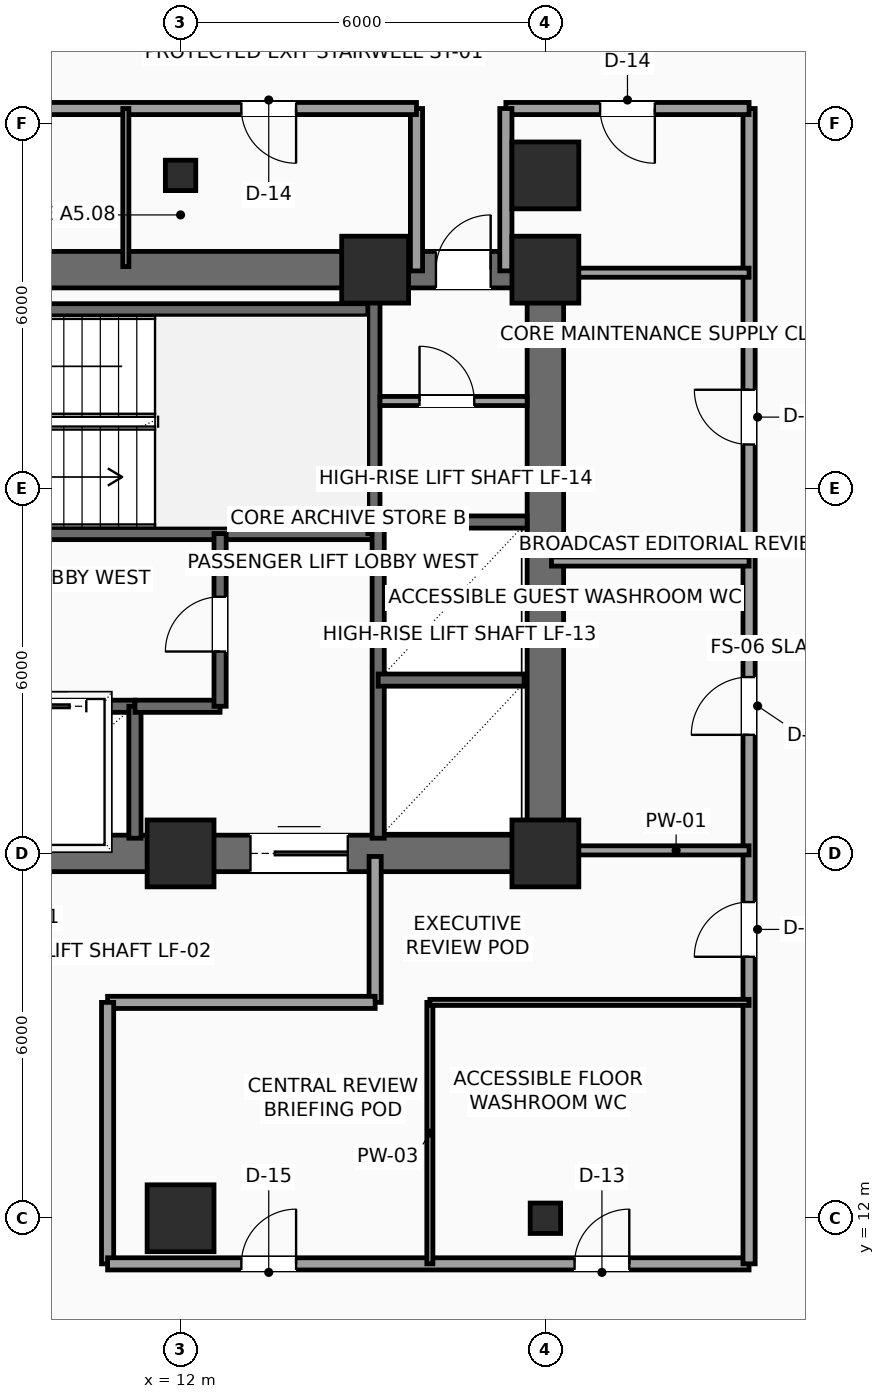
"""IFC4 building model, lengths in metres.
Left out: names, types, materials, properties, quantities, classifications, styles, units other than length and angle.
Written with IfcOpenShell. Run it as: python <this file> out.ifc"""

import sys

from ifc_helpers import new_model, si_unit, direction, frame, frame_2d, origin, origin_2d, place, context, subcontext, project, spatial, rectangle, hollow_rectangle, extrude, element, fill, save


model = new_model("IFC4")
c1 = context("Model", 3, precision=1e-05, world=origin(), true_north=direction((0.0, 1.0)))
c2 = subcontext(c1, "Body", "Model", "MODEL_VIEW")
j1 = project(units=[si_unit("LENGTHUNIT", "METRE"), si_unit("PLANEANGLEUNIT", "RADIAN")], contexts=[c1])
p1 = place(None, origin())
s1 = spatial("IfcSite", under=j1, at=p1, CompositionType="ELEMENT")
p2 = place(p1, origin())
s2 = spatial("IfcBuilding", under=s1, at=p2, CompositionType="ELEMENT")
p3 = place(p2, frame((0.0, 0.0, 145.65)))
s3 = spatial("IfcBuildingStorey", under=s2, at=p3, CompositionType="ELEMENT", Elevation=145.65)
for number, where, z_axis, x_axis in (
    (1, (12.0, 18.0, 0.0), (0.0, 0.0, 1.0), (1.0, 0.0, 0.0)),
    (2, (18.0, 18.0, 0.0), (0.0, 0.0, 1.0), (1.0, 0.0, 0.0)),
    (3, (15.2, 27.6, 0.0), (0.0, 0.0, 1.0), (1.0, 0.0, 0.0)),
    (4, (18.0, 27.6, 0.0), (0.0, 0.0, 1.0), (1.0, 0.0, 0.0)),
    (5, (12.0, 12.0, 0.0), (0.0, 0.0, 1.0), (1.0, 0.0, 0.0)),
):
    element("IfcColumn", number, at=place(p3, frame(where, z_axis=z_axis, x_axis=x_axis)), inside=s3, PredefinedType="COLUMN", context=c2, shape_type="SweptSolid", body=[
        extrude(rectangle(XDim=1.1, YDim=1.1, at=origin_2d()), origin(), (0.0, 0.0, 1.0), 3.75),
    ])
for number, where, z_axis, x_axis in (
    (6, (12.0, 29.15, 0.0), (0.0, 0.0, 1.0), (1.0, 0.0, 0.0)),
    (7, (18.0, 12.0, 0.0), (0.0, 0.0, 1.0), (1.0, 0.0, 0.0)),
):
    element("IfcColumn", number, at=place(p3, frame(where, z_axis=z_axis, x_axis=x_axis)), inside=s3, PredefinedType="COLUMN", context=c2, shape_type="SweptSolid", body=[
        extrude(hollow_rectangle(XDim=0.5, YDim=0.5, WallThickness=0.025, InnerFilletRadius=0.025, OuterFilletRadius=0.04, at=origin_2d()), origin(), (0.0, 0.0, 1.0), 3.75),
    ])
p4 = place(p3, frame((18.0, 29.15, 0.0), z_axis=(0.0, 0.0, 1.0), x_axis=(1.0, 0.0, 0.0)))
e8 = element("IfcColumn", 8, at=p4, inside=s3, PredefinedType="COLUMN", context=c2, shape_type="SweptSolid", body=[
    extrude(rectangle(XDim=1.1, YDim=1.1, at=origin_2d()), origin(), (0.0, 0.0, 1.0), 3.75),
])
p5 = place(p3, frame((6.0, 18.0, 0.0), z_axis=(0.0, 0.0, 1.0), x_axis=(1.0, 0.0, 0.0)))
e9 = element("IfcWall", 9, at=p5, inside=s3, PredefinedType="SHEAR", context=c2, shape_type="SweptSolid", body=[
    extrude(rectangle(XDim=12.0, YDim=0.6, at=frame_2d((6.0, 0.0))), origin(), (0.0, 0.0, 1.0), 3.525),
])
p6 = place(p5, frame((7.15, 0.0, 0.0)))
e10 = element("IfcOpeningElement", 10, at=p6, cuts=e9, PredefinedType="OPENING", context=c2, shape_type="SweptSolid", body=[
    extrude(rectangle(XDim=1.6, YDim=2.3, at=frame_2d((0.8, 1.15))), frame((0.0, 0.31, 0.0), z_axis=(0.0, -1.0, 0.0), x_axis=(1.0, 0.0, 0.0)), (0.0, 0.0, 1.0), 0.62),
])
p7 = place(p3, frame((6.0, 27.6, 0.0), z_axis=(0.0, 0.0, 1.0), x_axis=(1.0, 0.0, 0.0)))
e11 = element("IfcWall", 11, at=p7, inside=s3, PredefinedType="SHEAR", context=c2, shape_type="SweptSolid", body=[
    extrude(rectangle(XDim=12.0, YDim=0.6, at=frame_2d((6.0, 0.0))), origin(), (0.0, 0.0, 1.0), 3.525),
])
p8 = place(p7, frame((10.2, 0.0, 0.0)))
e12 = element("IfcOpeningElement", 12, at=p8, cuts=e11, PredefinedType="OPENING", context=c2, shape_type="SweptSolid", body=[
    extrude(rectangle(XDim=0.9, YDim=2.15, at=frame_2d((0.45, 1.075))), frame((0.0, 0.31, 0.0), z_axis=(0.0, -1.0, 0.0), x_axis=(1.0, 0.0, 0.0)), (0.0, 0.0, 1.0), 0.62),
])
p9 = place(p3, frame((18.0, 18.0, 0.0), z_axis=(0.0, 0.0, 1.0), x_axis=(0.0, 1.0, 0.0)))
e13 = element("IfcWall", 13, at=p9, inside=s3, PredefinedType="SHEAR", context=c2, shape_type="SweptSolid", body=[
    extrude(rectangle(XDim=9.6, YDim=0.6, at=frame_2d((4.8, 0.0))), origin(), (0.0, 0.0, 1.0), 3.525),
])
p10 = place(p3, frame((6.3, 23.26, 0.0), z_axis=(0.0, 0.0, 1.0), x_axis=(1.0, 0.0, 0.0)))
e14 = element("IfcWall", 14, at=p10, inside=s3, PredefinedType="SHEAR", context=c2, shape_type="SweptSolid", body=[
    extrude(rectangle(XDim=8.88, YDim=0.2, at=frame_2d((4.44, 0.0))), origin(), (0.0, 0.0, 1.0), 3.525),
])
p11 = place(p10, frame((0.35, 0.0, 0.0)))
e15 = element("IfcOpeningElement", 15, at=p11, cuts=e14, PredefinedType="OPENING", context=c2, shape_type="SweptSolid", body=[
    extrude(rectangle(XDim=1.1, YDim=2.2, at=frame_2d((0.55, 1.1))), frame((0.0, 0.11, 0.0), z_axis=(0.0, -1.0, 0.0), x_axis=(1.0, 0.0, 0.0)), (0.0, 0.0, 1.0), 0.22),
])
p12 = place(p3, frame((6.3, 26.94, 0.0), z_axis=(0.0, 0.0, 1.0), x_axis=(1.0, 0.0, 0.0)))
e16 = element("IfcWall", 16, at=p12, inside=s3, PredefinedType="SHEAR", context=c2, shape_type="SweptSolid", body=[
    extrude(rectangle(XDim=8.88, YDim=0.2, at=frame_2d((4.44, 0.0))), origin(), (0.0, 0.0, 1.0), 3.525),
])
p13 = place(p3, frame((15.18, 23.26, 0.0), z_axis=(0.0, 0.0, 1.0), x_axis=(0.0, 1.0, 0.0)))
e17 = element("IfcWall", 17, at=p13, inside=s3, PredefinedType="SHEAR", context=c2, shape_type="SweptSolid", body=[
    extrude(rectangle(XDim=4.04, YDim=0.2, at=frame_2d((2.02, 0.0))), origin(), (0.0, 0.0, 1.0), 3.525),
])
p14 = place(p3, frame((6.3, 20.42, 0.0), z_axis=(0.0, 0.0, 1.0), x_axis=(1.0, 0.0, 0.0)))
e18 = element("IfcWall", 18, at=p14, inside=s3, PredefinedType="SHEAR", context=c2, shape_type="SweptSolid", body=[
    extrude(rectangle(XDim=4.95, YDim=0.2, at=frame_2d((2.475, 0.0))), origin(), (0.0, 0.0, 1.0), 3.525),
])
p15 = place(p14, frame((0.65, 0.0, 0.0)))
e19 = element("IfcOpeningElement", 19, at=p15, cuts=e18, PredefinedType="OPENING", context=c2, shape_type="SweptSolid", body=[
    extrude(rectangle(XDim=1.1, YDim=2.2, at=frame_2d((0.55, 1.1))), frame((0.0, 0.11, 0.0), z_axis=(0.0, -1.0, 0.0), x_axis=(1.0, 0.0, 0.0)), (0.0, 0.0, 1.0), 0.22),
])
p16 = place(p14, frame((3.05, 0.0, 0.0)))
e20 = element("IfcOpeningElement", 20, at=p16, cuts=e18, PredefinedType="OPENING", context=c2, shape_type="SweptSolid", body=[
    extrude(rectangle(XDim=1.1, YDim=2.2, at=frame_2d((0.55, 1.1))), frame((0.0, 0.11, 0.0), z_axis=(0.0, -1.0, 0.0), x_axis=(1.0, 0.0, 0.0)), (0.0, 0.0, 1.0), 0.22),
])
p17 = place(p3, frame((11.25, 18.25, 0.0), z_axis=(0.0, 0.0, 1.0), x_axis=(0.0, 1.0, 0.0)))
e21 = element("IfcWall", 21, at=p17, inside=s3, PredefinedType="SHEAR", context=c2, shape_type="SweptSolid", body=[
    extrude(rectangle(XDim=2.17, YDim=0.2, at=frame_2d((1.085, 0.0))), origin(), (0.0, 0.0, 1.0), 3.525),
])
p18 = place(p3, frame((11.25, 20.42, 0.0), z_axis=(0.0, 0.0, 1.0), x_axis=(1.0, 0.0, 0.0)))
e22 = element("IfcWall", 22, at=p18, inside=s3, PredefinedType="SHEAR", context=c2, shape_type="SweptSolid", body=[
    extrude(rectangle(XDim=1.4, YDim=0.2, at=frame_2d((0.7, 0.0))), origin(), (0.0, 0.0, 1.0), 3.525),
])
p19 = place(p3, frame((12.65, 20.42, 0.0), z_axis=(0.0, 0.0, 1.0), x_axis=(0.0, 1.0, 0.0)))
e23 = element("IfcWall", 23, at=p19, inside=s3, PredefinedType="SHEAR", context=c2, shape_type="SweptSolid", body=[
    extrude(rectangle(XDim=2.84, YDim=0.2, at=frame_2d((1.42, 0.0))), origin(), (0.0, 0.0, 1.0), 3.525),
])
p20 = place(p19, frame((0.9, 0.0, 0.0)))
e24 = element("IfcOpeningElement", 24, at=p20, cuts=e23, PredefinedType="OPENING", context=c2, shape_type="SweptSolid", body=[
    extrude(rectangle(XDim=0.9, YDim=2.15, at=frame_2d((0.45, 1.075))), frame((0.0, 0.11, 0.0), z_axis=(0.0, -1.0, 0.0), x_axis=(1.0, 0.0, 0.0)), (0.0, 0.0, 1.0), 0.22),
])
p21 = place(p3, frame((15.25, 18.25, 0.0), z_axis=(0.0, 0.0, 1.0), x_axis=(0.0, 1.0, 0.0)))
e25 = element("IfcWall", 25, at=p21, inside=s3, PredefinedType="SHEAR", context=c2, shape_type="SweptSolid", body=[
    extrude(rectangle(XDim=5.2, YDim=0.2, at=frame_2d((2.6, 0.0))), origin(), (0.0, 0.0, 1.0), 3.525),
])
p22 = place(p3, frame((15.25, 20.85, 0.0), z_axis=(0.0, 0.0, 1.0), x_axis=(1.0, 0.0, 0.0)))
e26 = element("IfcWall", 26, at=p22, inside=s3, PredefinedType="SHEAR", context=c2, shape_type="SweptSolid", body=[
    extrude(rectangle(XDim=2.4, YDim=0.2, at=frame_2d((1.2, 0.0))), origin(), (0.0, 0.0, 1.0), 3.525),
])
p23 = place(p3, frame((15.25, 23.45, 0.0), z_axis=(0.0, 0.0, 1.0), x_axis=(1.0, 0.0, 0.0)))
e27 = element("IfcWall", 27, at=p23, inside=s3, PredefinedType="SHEAR", context=c2, shape_type="SweptSolid", body=[
    extrude(rectangle(XDim=2.45, YDim=0.2, at=frame_2d((1.225, 0.0))), origin(), (0.0, 0.0, 1.0), 3.525),
])
p24 = place(p3, frame((15.28, 25.44, 0.0), z_axis=(0.0, 0.0, 1.0), x_axis=(1.0, 0.0, 0.0)))
e28 = element("IfcWall", 28, at=p24, inside=s3, PredefinedType="PARTITIONING", context=c2, shape_type="SweptSolid", body=[
    extrude(rectangle(XDim=2.42, YDim=0.15, at=frame_2d((1.21, 0.0))), origin(), (0.0, 0.0, 1.0), 3.525),
])
p25 = place(p24, frame((0.65, 0.0, 0.0)))
e29 = element("IfcOpeningElement", 29, at=p25, cuts=e28, PredefinedType="OPENING", context=c2, shape_type="SweptSolid", body=[
    extrude(rectangle(XDim=0.9, YDim=2.15, at=frame_2d((0.45, 1.075))), frame((0.0, 0.085, 0.0), z_axis=(0.0, -1.0, 0.0), x_axis=(1.0, 0.0, 0.0)), (0.0, 0.0, 1.0), 0.17),
])
p26 = place(p3, frame((15.2, 17.95, 0.0), z_axis=(0.0, 0.0, 1.0), x_axis=(0.0, -1.0, 0.0)))
e30 = element("IfcWall", 30, at=p26, inside=s3, PredefinedType="PARTITIONING", context=c2, shape_type="SweptSolid", body=[
    extrude(rectangle(XDim=2.4, YDim=0.2, at=frame_2d((1.2, 0.0))), origin(), (0.0, 0.0, 1.0), 3.525),
])
p27 = place(p3, frame((15.2, 15.55, 0.0), z_axis=(0.0, 0.0, 1.0), x_axis=(-1.0, 0.0, 0.0)))
e31 = element("IfcWall", 31, at=p27, inside=s3, PredefinedType="PARTITIONING", context=c2, shape_type="SweptSolid", body=[
    extrude(rectangle(XDim=4.4, YDim=0.2, at=frame_2d((2.2, 0.0))), origin(), (0.0, 0.0, 1.0), 3.525),
])
p28 = place(p3, frame((10.8, 15.55, 0.0), z_axis=(0.0, 0.0, 1.0), x_axis=(0.0, -1.0, 0.0)))
e32 = element("IfcWall", 32, at=p28, inside=s3, PredefinedType="PARTITIONING", context=c2, shape_type="SweptSolid", body=[
    extrude(rectangle(XDim=4.3, YDim=0.2, at=frame_2d((2.15, 0.0))), origin(), (0.0, 0.0, 1.0), 3.525),
])
p29 = place(p3, frame((10.8, 11.25, 0.0), z_axis=(0.0, 0.0, 1.0), x_axis=(1.0, 0.0, 0.0)))
e33 = element("IfcWall", 33, at=p29, inside=s3, PredefinedType="PARTITIONING", context=c2, shape_type="SweptSolid", body=[
    extrude(rectangle(XDim=10.55, YDim=0.2, at=frame_2d((5.275, 0.0))), origin(), (0.0, 0.0, 1.0), 3.525),
])
p30 = place(p29, frame((2.2, 0.0, 0.0)))
e34 = element("IfcOpeningElement", 34, at=p30, cuts=e33, PredefinedType="OPENING", context=c2, shape_type="SweptSolid", body=[
    extrude(rectangle(XDim=0.9, YDim=2.1, at=frame_2d((0.45, 1.05))), frame((0.0, 0.11, 0.0), z_axis=(0.0, -1.0, 0.0), x_axis=(1.0, 0.0, 0.0)), (0.0, 0.0, 1.0), 0.22),
])
p31 = place(p29, frame((7.68, 0.0, 0.0)))
e35 = element("IfcOpeningElement", 35, at=p31, cuts=e33, PredefinedType="OPENING", context=c2, shape_type="SweptSolid", body=[
    extrude(rectangle(XDim=0.9, YDim=2.1, at=frame_2d((0.45, 1.05))), frame((0.0, 0.11, 0.0), z_axis=(0.0, -1.0, 0.0), x_axis=(1.0, 0.0, 0.0)), (0.0, 0.0, 1.0), 0.22),
])
p32 = place(p3, frame((21.35, 11.25, 0.0), z_axis=(0.0, 0.0, 1.0), x_axis=(0.0, 1.0, 0.0)))
e36 = element("IfcWall", 36, at=p32, inside=s3, PredefinedType="PARTITIONING", context=c2, shape_type="SweptSolid", body=[
    extrude(rectangle(XDim=19.0, YDim=0.2, at=frame_2d((9.5, 0.0))), origin(), (0.0, 0.0, 1.0), 3.525),
])
p33 = place(p32, frame((8.7, 0.0, 0.0)))
e37 = element("IfcOpeningElement", 37, at=p33, cuts=e36, PredefinedType="OPENING", context=c2, shape_type="SweptSolid", body=[
    extrude(rectangle(XDim=0.95, YDim=2.15, at=frame_2d((0.475, 1.075))), frame((0.0, 0.11, 0.0), z_axis=(0.0, -1.0, 0.0), x_axis=(1.0, 0.0, 0.0)), (0.0, 0.0, 1.0), 0.22),
])
p34 = place(p32, frame((13.475, 0.0, 0.0)))
e38 = element("IfcOpeningElement", 38, at=p34, cuts=e36, PredefinedType="OPENING", context=c2, shape_type="SweptSolid", body=[
    extrude(rectangle(XDim=0.9, YDim=2.1, at=frame_2d((0.45, 1.05))), frame((0.0, 0.11, 0.0), z_axis=(0.0, -1.0, 0.0), x_axis=(1.0, 0.0, 0.0)), (0.0, 0.0, 1.0), 0.22),
])
p35 = place(p32, frame((5.05, 0.0, 0.0)))
e39 = element("IfcOpeningElement", 39, at=p35, cuts=e36, PredefinedType="OPENING", context=c2, shape_type="SweptSolid", body=[
    extrude(rectangle(XDim=0.9, YDim=2.1, at=frame_2d((0.45, 1.05))), frame((0.0, 0.11, 0.0), z_axis=(0.0, -1.0, 0.0), x_axis=(1.0, 0.0, 0.0)), (0.0, 0.0, 1.0), 0.22),
])
p36 = place(p3, frame((21.35, 30.25, 0.0), z_axis=(0.0, 0.0, 1.0), x_axis=(-1.0, 0.0, 0.0)))
e40 = element("IfcWall", 40, at=p36, inside=s3, PredefinedType="PARTITIONING", context=c2, shape_type="SweptSolid", body=[
    extrude(rectangle(XDim=4.0, YDim=0.2, at=frame_2d((2.0, 0.0))), origin(), (0.0, 0.0, 1.0), 3.525),
])
p37 = place(p36, frame((1.55, 0.0, 0.0)))
e41 = element("IfcOpeningElement", 41, at=p37, cuts=e40, PredefinedType="OPENING", context=c2, shape_type="SweptSolid", body=[
    extrude(rectangle(XDim=0.9, YDim=2.1, at=frame_2d((0.45, 1.05))), frame((0.0, 0.11, 0.0), z_axis=(0.0, -1.0, 0.0), x_axis=(1.0, 0.0, 0.0)), (0.0, 0.0, 1.0), 0.22),
])
for number, where, z_axis, x_axis in (
    (42, (17.35, 30.25, 0.0), (0.0, 0.0, 1.0), (0.0, -1.0, 0.0)),
    (43, (15.88, 27.58, 0.0), (0.0, 0.0, 1.0), (0.0, 1.0, 0.0)),
):
    element("IfcWall", number, at=place(p3, frame(where, z_axis=z_axis, x_axis=x_axis)), inside=s3, PredefinedType="PARTITIONING", context=c2, shape_type="SweptSolid", body=[
        extrude(rectangle(XDim=2.67, YDim=0.2, at=frame_2d((1.335, 0.0))), origin(), (0.0, 0.0, 1.0), 3.525),
    ])
p38 = place(p3, frame((15.88, 30.25, 0.0), z_axis=(0.0, 0.0, 1.0), x_axis=(-1.0, 0.0, 0.0)))
e44 = element("IfcWall", 44, at=p38, inside=s3, PredefinedType="PARTITIONING", context=c2, shape_type="SweptSolid", body=[
    extrude(rectangle(XDim=15.58, YDim=0.2, at=frame_2d((7.79, 0.0))), origin(), (0.0, 0.0, 1.0), 3.525),
])
p39 = place(p38, frame((12.28, 0.0, 0.0)))
e45 = element("IfcOpeningElement", 45, at=p39, cuts=e44, PredefinedType="OPENING", context=c2, shape_type="SweptSolid", body=[
    extrude(rectangle(XDim=0.9, YDim=2.1, at=frame_2d((0.45, 1.05))), frame((0.0, 0.11, 0.0), z_axis=(0.0, -1.0, 0.0), x_axis=(1.0, 0.0, 0.0)), (0.0, 0.0, 1.0), 0.22),
])
p40 = place(p38, frame((6.73, 0.0, 0.0)))
e46 = element("IfcOpeningElement", 46, at=p40, cuts=e44, PredefinedType="OPENING", context=c2, shape_type="SweptSolid", body=[
    extrude(rectangle(XDim=0.9, YDim=2.1, at=frame_2d((0.45, 1.05))), frame((0.0, 0.11, 0.0), z_axis=(0.0, -1.0, 0.0), x_axis=(1.0, 0.0, 0.0)), (0.0, 0.0, 1.0), 0.22),
])
p41 = place(p38, frame((1.98, 0.0, 0.0)))
e47 = element("IfcOpeningElement", 47, at=p41, cuts=e44, PredefinedType="OPENING", context=c2, shape_type="SweptSolid", body=[
    extrude(rectangle(XDim=0.9, YDim=2.1, at=frame_2d((0.45, 1.05))), frame((0.0, 0.11, 0.0), z_axis=(0.0, -1.0, 0.0), x_axis=(1.0, 0.0, 0.0)), (0.0, 0.0, 1.0), 0.22),
])
p42 = place(p3, frame((16.1, 11.25, 0.0), z_axis=(0.0, 0.0, 1.0), x_axis=(0.0, 1.0, 0.0)))
e48 = element("IfcWall", 48, at=p42, inside=s3, PredefinedType="PARTITIONING", context=c2, shape_type="SweptSolid", body=[
    extrude(rectangle(XDim=4.3, YDim=0.1, at=frame_2d((2.15, 0.0))), origin(), (0.0, 0.0, 1.0), 3.525),
])
p43 = place(p3, frame((16.1, 15.55, 0.0), z_axis=(0.0, 0.0, 1.0), x_axis=(1.0, 0.0, 0.0)))
e49 = element("IfcWall", 49, at=p43, inside=s3, PredefinedType="PARTITIONING", context=c2, shape_type="SweptSolid", body=[
    extrude(rectangle(XDim=5.25, YDim=0.1, at=frame_2d((2.625, 0.0))), origin(), (0.0, 0.0, 1.0), 3.525),
])
p44 = place(p3, frame((18.1, 18.05, 0.0), z_axis=(0.0, 0.0, 1.0), x_axis=(1.0, 0.0, 0.0)))
e50 = element("IfcWall", 50, at=p44, inside=s3, PredefinedType="PARTITIONING", context=c2, shape_type="SweptSolid", body=[
    extrude(rectangle(XDim=3.25, YDim=0.15, at=frame_2d((1.625, 0.0))), origin(), (0.0, 0.0, 1.0), 3.017),
])
for number, where, z_axis, x_axis in (
    (51, (18.1, 22.8, 0.0), (0.0, 0.0, 1.0), (1.0, 0.0, 0.0)),
    (52, (18.1, 27.55, 0.0), (0.0, 0.0, 1.0), (1.0, 0.0, 0.0)),
):
    element("IfcWall", number, at=place(p3, frame(where, z_axis=z_axis, x_axis=x_axis)), inside=s3, PredefinedType="PARTITIONING", context=c2, shape_type="SweptSolid", body=[
        extrude(rectangle(XDim=3.25, YDim=0.15, at=frame_2d((1.625, 0.0))), origin(), (0.0, 0.0, 1.0), 3.525),
    ])
p45 = place(p3, frame((11.1, 27.65, 0.0), z_axis=(0.0, 0.0, 1.0), x_axis=(0.0, 1.0, 0.0)))
e53 = element("IfcWall", 53, at=p45, inside=s3, PredefinedType="PARTITIONING", context=c2, shape_type="SweptSolid", body=[
    extrude(rectangle(XDim=2.6, YDim=0.1, at=frame_2d((1.3, 0.0))), origin(), (0.0, 0.0, 1.0), 3.525),
])
p46 = place(p6, origin())
e54 = element("IfcDoor", 54, at=p46, inside=s3, OperationType="DOUBLE_DOOR_SLIDING", PredefinedType="DOOR", context=c2, shape_type="SweptSolid", body=[
    extrude(rectangle(XDim=1.6, YDim=2.3, at=frame_2d((0.8, 1.15))), frame((0.0, 0.025, 0.0), z_axis=(0.0, -1.0, 0.0), x_axis=(1.0, 0.0, 0.0)), (0.0, 0.0, 1.0), 0.05),
])
fill(e10, e54)
p47 = place(p8, origin())
e55 = element("IfcDoor", 55, at=p47, inside=s3, OperationType="SINGLE_SWING_RIGHT", PredefinedType="DOOR", context=c2, shape_type="SweptSolid", body=[
    extrude(rectangle(XDim=0.9, YDim=2.15, at=frame_2d((0.45, 1.075))), frame((0.0, 0.025, 0.0), z_axis=(0.0, -1.0, 0.0), x_axis=(1.0, 0.0, 0.0)), (0.0, 0.0, 1.0), 0.05),
])
fill(e12, e55)
p48 = place(p16, origin())
e56 = element("IfcDoor", 56, at=p48, inside=s3, OperationType="SLIDING_TO_LEFT", PredefinedType="DOOR", context=c2, shape_type="SweptSolid", body=[
    extrude(rectangle(XDim=1.1, YDim=2.2, at=frame_2d((0.55, 1.1))), frame((0.0, 0.025, 0.0), z_axis=(0.0, -1.0, 0.0), x_axis=(1.0, 0.0, 0.0)), (0.0, 0.0, 1.0), 0.05),
])
fill(e20, e56)
p49 = place(p20, origin())
e57 = element("IfcDoor", 57, at=p49, inside=s3, OperationType="SINGLE_SWING_LEFT", PredefinedType="DOOR", context=c2, shape_type="SweptSolid", body=[
    extrude(rectangle(XDim=0.9, YDim=2.15, at=frame_2d((0.45, 1.075))), frame((0.0, 0.025, 0.0), z_axis=(0.0, -1.0, 0.0), x_axis=(1.0, 0.0, 0.0)), (0.0, 0.0, 1.0), 0.05),
])
fill(e24, e57)
p50 = place(p25, origin())
e58 = element("IfcDoor", 58, at=p50, inside=s3, OperationType="SINGLE_SWING_LEFT", PredefinedType="DOOR", context=c2, shape_type="SweptSolid", body=[
    extrude(rectangle(XDim=0.9, YDim=2.15, at=frame_2d((0.45, 1.075))), frame((0.0, 0.025, 0.0), z_axis=(0.0, -1.0, 0.0), x_axis=(1.0, 0.0, 0.0)), (0.0, 0.0, 1.0), 0.05),
])
fill(e29, e58)
p51 = place(p30, origin())
e59 = element("IfcDoor", 59, at=p51, inside=s3, OperationType="SINGLE_SWING_RIGHT", PredefinedType="DOOR", context=c2, shape_type="SweptSolid", body=[
    extrude(rectangle(XDim=0.9, YDim=2.1, at=frame_2d((0.45, 1.05))), frame((0.0, 0.025, 0.0), z_axis=(0.0, -1.0, 0.0), x_axis=(1.0, 0.0, 0.0)), (0.0, 0.0, 1.0), 0.05),
])
fill(e34, e59)
p52 = place(p31, origin())
e60 = element("IfcDoor", 60, at=p52, inside=s3, OperationType="SINGLE_SWING_RIGHT", PredefinedType="DOOR", context=c2, shape_type="SweptSolid", body=[
    extrude(rectangle(XDim=0.9, YDim=2.1, at=frame_2d((0.45, 1.05))), frame((0.0, 0.025, 0.0), z_axis=(0.0, -1.0, 0.0), x_axis=(1.0, 0.0, 0.0)), (0.0, 0.0, 1.0), 0.05),
])
fill(e35, e60)
p53 = place(p33, origin())
e61 = element("IfcDoor", 61, at=p53, inside=s3, OperationType="SINGLE_SWING_LEFT", PredefinedType="DOOR", context=c2, shape_type="SweptSolid", body=[
    extrude(rectangle(XDim=0.95, YDim=2.15, at=frame_2d((0.475, 1.075))), frame((0.0, 0.025, 0.0), z_axis=(0.0, -1.0, 0.0), x_axis=(1.0, 0.0, 0.0)), (0.0, 0.0, 1.0), 0.05),
])
fill(e37, e61)
p54 = place(p34, origin())
e62 = element("IfcDoor", 62, at=p54, inside=s3, OperationType="SINGLE_SWING_RIGHT", PredefinedType="DOOR", context=c2, shape_type="SweptSolid", body=[
    extrude(rectangle(XDim=0.9, YDim=2.1, at=frame_2d((0.45, 1.05))), frame((0.0, 0.025, 0.0), z_axis=(0.0, -1.0, 0.0), x_axis=(1.0, 0.0, 0.0)), (0.0, 0.0, 1.0), 0.05),
])
fill(e38, e62)
p55 = place(p35, origin())
e63 = element("IfcDoor", 63, at=p55, inside=s3, OperationType="SINGLE_SWING_LEFT", PredefinedType="DOOR", context=c2, shape_type="SweptSolid", body=[
    extrude(rectangle(XDim=0.9, YDim=2.1, at=frame_2d((0.45, 1.05))), frame((0.0, 0.025, 0.0), z_axis=(0.0, -1.0, 0.0), x_axis=(1.0, 0.0, 0.0)), (0.0, 0.0, 1.0), 0.05),
])
fill(e39, e63)
p56 = place(p37, origin())
e64 = element("IfcDoor", 64, at=p56, inside=s3, OperationType="SINGLE_SWING_LEFT", PredefinedType="DOOR", context=c2, shape_type="SweptSolid", body=[
    extrude(rectangle(XDim=0.9, YDim=2.1, at=frame_2d((0.45, 1.05))), frame((0.0, 0.025, 0.0), z_axis=(0.0, -1.0, 0.0), x_axis=(1.0, 0.0, 0.0)), (0.0, 0.0, 1.0), 0.05),
])
fill(e41, e64)
p57 = place(p41, origin())
e65 = element("IfcDoor", 65, at=p57, inside=s3, OperationType="SINGLE_SWING_LEFT", PredefinedType="DOOR", context=c2, shape_type="SweptSolid", body=[
    extrude(rectangle(XDim=0.9, YDim=2.1, at=frame_2d((0.45, 1.05))), frame((0.0, 0.025, 0.0), z_axis=(0.0, -1.0, 0.0), x_axis=(1.0, 0.0, 0.0)), (0.0, 0.0, 1.0), 0.05),
])
fill(e47, e65)
save(model, sys.argv[1])
